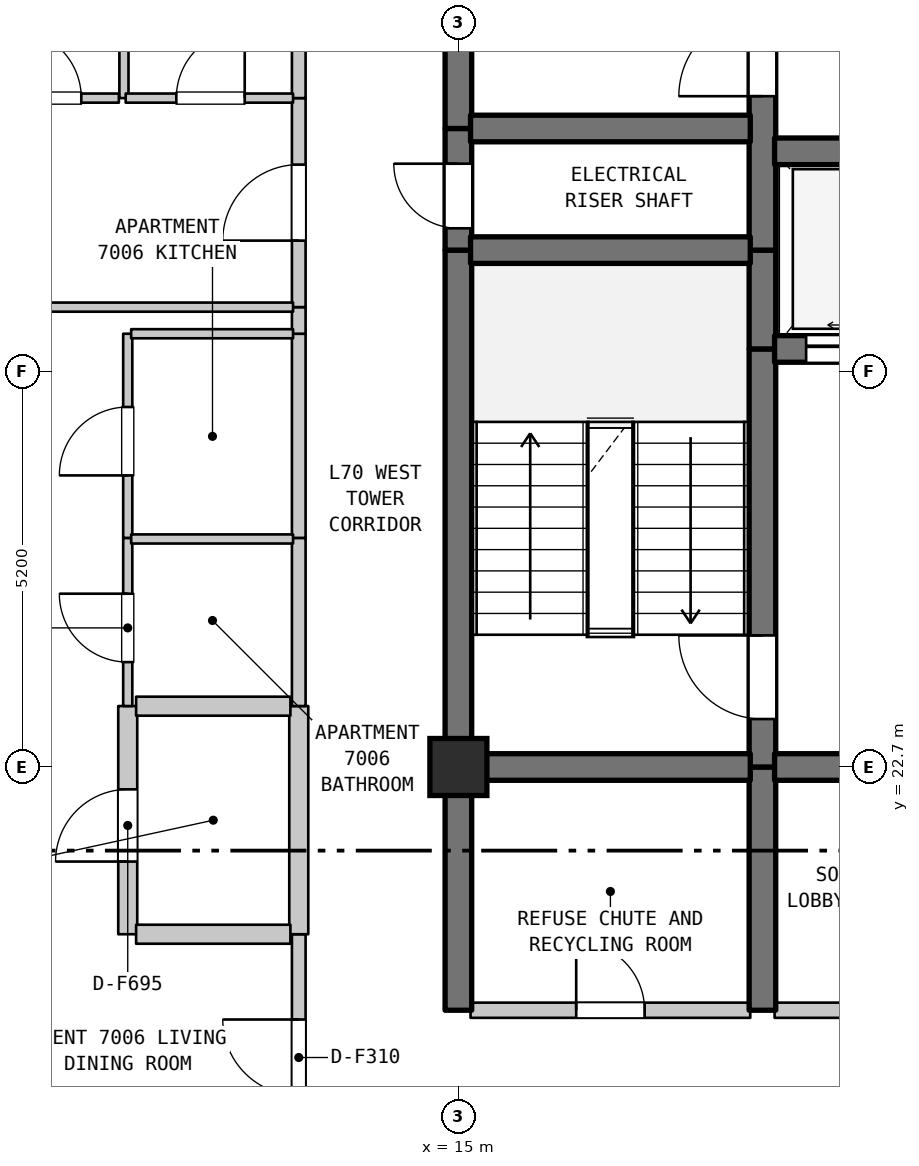
"""IFC4 building model, lengths in metres.
Left out: names, types, materials, properties, quantities, classifications, styles, units other than length and angle.
Written with IfcOpenShell. Run it as: python <this file> out.ifc"""

import sys

from ifc_helpers import new_model, si_unit, direction, frame, frame_2d, origin, origin_2d, place, context, subcontext, project, spatial, rectangle, extrude, element, fill, save


model = new_model("IFC4")
c1 = context("Model", 3, precision=1e-05, world=origin(), true_north=direction((0.0, 1.0)))
c2 = subcontext(c1, "Body", "Model", "MODEL_VIEW")
j1 = project(units=[si_unit("LENGTHUNIT", "METRE"), si_unit("PLANEANGLEUNIT", "RADIAN")], contexts=[c1])
p1 = place(None, origin())
s1 = spatial("IfcSite", under=j1, at=p1, CompositionType="ELEMENT")
p2 = place(p1, origin())
s2 = spatial("IfcBuilding", under=s1, at=p2, CompositionType="ELEMENT")
p3 = place(p2, frame((0.0, 0.0, 280.6)))
s3 = spatial("IfcBuildingStorey", under=s2, at=p3, CompositionType="ELEMENT", Elevation=280.6)
p4 = place(p3, frame((15.0, 22.7, 0.0), z_axis=(0.0, 0.0, 1.0), x_axis=(1.0, 0.0, 0.0)))
e1 = element("IfcColumn", 1, at=p4, inside=s3, PredefinedType="COLUMN", context=c2, shape_type="SweptSolid", body=[
    extrude(rectangle(XDim=0.75, YDim=0.75, at=origin_2d()), origin(), (0.0, 0.0, 1.0), 3.7),
])
p5 = place(p3, frame((10.6, 31.5, 0.0), z_axis=(0.0, 0.0, 1.0), x_axis=(0.0, 1.0, 0.0)))
e2 = element("IfcWall", 2, at=p5, inside=s3, PredefinedType="PARTITIONING", context=c2, shape_type="SweptSolid", body=[
    extrude(rectangle(XDim=8.6, YDim=0.12, at=frame_2d((4.3, 0.0))), origin(), (0.0, 0.0, 1.0), 3.39),
])
p6 = place(p3, frame((10.65, 20.5, 0.0), z_axis=(0.0, 0.0, 1.0), x_axis=(0.0, 1.0, 0.0)))
e3 = element("IfcWall", 3, at=p6, inside=s3, PredefinedType="STANDARD", context=c2, shape_type="SweptSolid", body=[
    extrude(rectangle(XDim=3.002, YDim=0.25, at=frame_2d((1.501, 0.0))), origin(), (0.0, 0.0, 1.0), 3.39),
])
p7 = place(p6, frame((0.956, 0.0, 0.0)))
e4 = element("IfcOpeningElement", 4, at=p7, cuts=e3, PredefinedType="OPENING", context=c2, shape_type="SweptSolid", body=[
    extrude(rectangle(XDim=0.95, YDim=2.15, at=frame_2d((0.475, 1.075))), frame((0.0, 0.135, 0.0), z_axis=(0.0, -1.0, 0.0), x_axis=(1.0, 0.0, 0.0)), (0.0, 0.0, 1.0), 0.27),
])
p8 = place(p3, frame((10.65, 23.502, 0.0), z_axis=(0.0, 0.0, 1.0), x_axis=(0.0, 1.0, 0.0)))
e5 = element("IfcWall", 5, at=p8, inside=s3, PredefinedType="PARTITIONING", context=c2, shape_type="SweptSolid", body=[
    extrude(rectangle(XDim=2.212, YDim=0.12, at=frame_2d((1.106, 0.0))), origin(), (0.0, 0.0, 1.0), 3.39),
])
p9 = place(p8, frame((0.578, 0.0, 0.0)))
e6 = element("IfcOpeningElement", 6, at=p9, cuts=e5, PredefinedType="OPENING", context=c2, shape_type="SweptSolid", body=[
    extrude(rectangle(XDim=0.9, YDim=2.1, at=frame_2d((0.45, 1.05))), frame((0.0, 0.07, 0.0), z_axis=(0.0, -1.0, 0.0), x_axis=(1.0, 0.0, 0.0)), (0.0, 0.0, 1.0), 0.14),
])
p10 = place(p3, frame((10.65, 25.714, 0.0), z_axis=(0.0, 0.0, 1.0), x_axis=(0.0, 1.0, 0.0)))
e7 = element("IfcWall", 7, at=p10, inside=s3, PredefinedType="PARTITIONING", context=c2, shape_type="SweptSolid", body=[
    extrude(rectangle(XDim=2.686, YDim=0.12, at=frame_2d((1.343, 0.0))), origin(), (0.0, 0.0, 1.0), 3.39),
])
p11 = place(p10, frame((0.822, 0.0, 0.0)))
e8 = element("IfcOpeningElement", 8, at=p11, cuts=e7, PredefinedType="OPENING", context=c2, shape_type="SweptSolid", body=[
    extrude(rectangle(XDim=0.9, YDim=2.15, at=frame_2d((0.45, 1.075))), frame((0.0, 0.07, 0.0), z_axis=(0.0, -1.0, 0.0), x_axis=(1.0, 0.0, 0.0)), (0.0, 0.0, 1.0), 0.14),
])
p12 = place(p3, frame((12.9, 17.4, 0.0), z_axis=(0.0, 0.0, 1.0), x_axis=(0.0, 1.0, 0.0)))
e9 = element("IfcWall", 9, at=p12, inside=s3, PredefinedType="STANDARD", context=c2, shape_type="SweptSolid", body=[
    extrude(rectangle(XDim=3.1, YDim=0.18, at=frame_2d((1.55, 0.0))), origin(), (0.0, 0.0, 1.0), 3.39),
])
p13 = place(p12, frame((0.978, 0.0, 0.0)))
e10 = element("IfcOpeningElement", 10, at=p13, cuts=e9, PredefinedType="OPENING", context=c2, shape_type="SweptSolid", body=[
    extrude(rectangle(XDim=1.0, YDim=2.15, at=frame_2d((0.5, 1.075))), frame((0.0, 0.1, 0.0), z_axis=(0.0, -1.0, 0.0), x_axis=(1.0, 0.0, 0.0)), (0.0, 0.0, 1.0), 0.2),
])
p14 = place(p3, frame((12.9, 20.5, 0.0), z_axis=(0.0, 0.0, 1.0), x_axis=(0.0, 1.0, 0.0)))
e11 = element("IfcWall", 11, at=p14, inside=s3, PredefinedType="STANDARD", context=c2, shape_type="SweptSolid", body=[
    extrude(rectangle(XDim=3.002, YDim=0.25, at=frame_2d((1.501, 0.0))), origin(), (0.0, 0.0, 1.0), 3.39),
])
p15 = place(p3, frame((12.9, 23.502, 0.0), z_axis=(0.0, 0.0, 1.0), x_axis=(0.0, 1.0, 0.0)))
e12 = element("IfcWall", 12, at=p15, inside=s3, PredefinedType="STANDARD", context=c2, shape_type="SweptSolid", body=[
    extrude(rectangle(XDim=2.212, YDim=0.18, at=frame_2d((1.106, 0.0))), origin(), (0.0, 0.0, 1.0), 3.39),
])
p16 = place(p3, frame((12.9, 25.714, 0.0), z_axis=(0.0, 0.0, 1.0), x_axis=(0.0, 1.0, 0.0)))
e13 = element("IfcWall", 13, at=p16, inside=s3, PredefinedType="STANDARD", context=c2, shape_type="SweptSolid", body=[
    extrude(rectangle(XDim=2.686, YDim=0.18, at=frame_2d((1.343, 0.0))), origin(), (0.0, 0.0, 1.0), 3.39),
])
p17 = place(p3, frame((12.9, 28.4, 0.0), z_axis=(0.0, 0.0, 1.0), x_axis=(0.0, 1.0, 0.0)))
e14 = element("IfcWall", 14, at=p17, inside=s3, PredefinedType="STANDARD", context=c2, shape_type="SweptSolid", body=[
    extrude(rectangle(XDim=0.35, YDim=0.18, at=frame_2d((0.175, 0.0))), origin(), (0.0, 0.0, 1.0), 3.39),
])
p18 = place(p3, frame((12.9, 28.75, 0.0), z_axis=(0.0, 0.0, 1.0), x_axis=(0.0, 1.0, 0.0)))
e15 = element("IfcWall", 15, at=p18, inside=s3, PredefinedType="STANDARD", context=c2, shape_type="SweptSolid", body=[
    extrude(rectangle(XDim=2.75, YDim=0.18, at=frame_2d((1.375, 0.0))), origin(), (0.0, 0.0, 1.0), 3.39),
])
p19 = place(p18, frame((0.875, 0.0, 0.0)))
e16 = element("IfcOpeningElement", 16, at=p19, cuts=e15, PredefinedType="OPENING", context=c2, shape_type="SweptSolid", body=[
    extrude(rectangle(XDim=1.0, YDim=2.15, at=frame_2d((0.5, 1.075))), frame((0.0, 0.1, 0.0), z_axis=(0.0, -1.0, 0.0), x_axis=(1.0, 0.0, 0.0)), (0.0, 0.0, 1.0), 0.2),
])
p20 = place(p3, frame((12.9, 31.5, 0.0), z_axis=(0.0, 0.0, 1.0), x_axis=(0.0, 1.0, 0.0)))
e17 = element("IfcWall", 17, at=p20, inside=s3, PredefinedType="STANDARD", context=c2, shape_type="SweptSolid", body=[
    extrude(rectangle(XDim=8.6, YDim=0.18, at=frame_2d((4.3, 0.0))), origin(), (0.0, 0.0, 1.0), 3.39),
])
p21 = place(p3, frame((15.0, 19.5, 0.0), z_axis=(0.0, 0.0, 1.0), x_axis=(0.0, 1.0, 0.0)))
e18 = element("IfcWall", 18, at=p21, inside=s3, PredefinedType="SHEAR", context=c2, shape_type="SweptSolid", body=[
    extrude(rectangle(XDim=3.2, YDim=0.35, at=frame_2d((1.6, 0.0))), origin(), (0.0, 0.0, 1.0), 3.39),
])
p22 = place(p3, frame((15.0, 22.7, 0.0), z_axis=(0.0, 0.0, 1.0), x_axis=(0.0, 1.0, 0.0)))
e19 = element("IfcWall", 19, at=p22, inside=s3, PredefinedType="SHEAR", context=c2, shape_type="SweptSolid", body=[
    extrude(rectangle(XDim=6.8, YDim=0.35, at=frame_2d((3.4, 0.0))), origin(), (0.0, 0.0, 1.0), 3.39),
])
p23 = place(p3, frame((15.0, 29.5, 0.0), z_axis=(0.0, 0.0, 1.0), x_axis=(0.0, 1.0, 0.0)))
e20 = element("IfcWall", 20, at=p23, inside=s3, PredefinedType="SHEAR", context=c2, shape_type="SweptSolid", body=[
    extrude(rectangle(XDim=1.6, YDim=0.35, at=frame_2d((0.8, 0.0))), origin(), (0.0, 0.0, 1.0), 3.39),
])
p24 = place(p23, frame((0.287, 0.0, 0.0)))
e21 = element("IfcOpeningElement", 21, at=p24, cuts=e20, PredefinedType="OPENING", context=c2, shape_type="SweptSolid", body=[
    extrude(rectangle(XDim=0.85, YDim=2.1, at=frame_2d((0.425, 1.05))), frame((0.0, 0.185, 0.0), z_axis=(0.0, -1.0, 0.0), x_axis=(1.0, 0.0, 0.0)), (0.0, 0.0, 1.0), 0.37),
])
p25 = place(p3, frame((15.0, 31.1, 0.0), z_axis=(0.0, 0.0, 1.0), x_axis=(0.0, 1.0, 0.0)))
e22 = element("IfcWall", 22, at=p25, inside=s3, PredefinedType="SHEAR", context=c2, shape_type="SweptSolid", body=[
    extrude(rectangle(XDim=6.8, YDim=0.35, at=frame_2d((3.4, 0.0))), origin(), (0.0, 0.0, 1.0), 3.39),
])
p26 = place(p3, frame((19.0, 19.5, 0.0), z_axis=(0.0, 0.0, 1.0), x_axis=(0.0, 1.0, 0.0)))
e23 = element("IfcWall", 23, at=p26, inside=s3, PredefinedType="SHEAR", context=c2, shape_type="SweptSolid", body=[
    extrude(rectangle(XDim=3.2, YDim=0.35, at=frame_2d((1.6, 0.0))), origin(), (0.0, 0.0, 1.0), 3.39),
])
p27 = place(p3, frame((19.0, 22.7, 0.0), z_axis=(0.0, 0.0, 1.0), x_axis=(0.0, 1.0, 0.0)))
e24 = element("IfcWall", 24, at=p27, inside=s3, PredefinedType="SHEAR", context=c2, shape_type="SweptSolid", body=[
    extrude(rectangle(XDim=5.5, YDim=0.35, at=frame_2d((2.75, 0.0))), origin(), (0.0, 0.0, 1.0), 3.39),
])
p28 = place(p27, frame((0.631, 0.0, 0.0)))
e25 = element("IfcOpeningElement", 25, at=p28, cuts=e24, PredefinedType="OPENING", context=c2, shape_type="SweptSolid", body=[
    extrude(rectangle(XDim=1.1, YDim=2.15, at=frame_2d((0.55, 1.075))), frame((0.0, 0.185, 0.0), z_axis=(0.0, -1.0, 0.0), x_axis=(1.0, 0.0, 0.0)), (0.0, 0.0, 1.0), 0.37),
])
p29 = place(p3, frame((19.0, 28.2, 0.0), z_axis=(0.0, 0.0, 1.0), x_axis=(0.0, 1.0, 0.0)))
e26 = element("IfcWall", 26, at=p29, inside=s3, PredefinedType="SHEAR", context=c2, shape_type="SweptSolid", body=[
    extrude(rectangle(XDim=1.3, YDim=0.35, at=frame_2d((0.65, 0.0))), origin(), (0.0, 0.0, 1.0), 3.39),
])
p30 = place(p3, frame((19.0, 29.5, 0.0), z_axis=(0.0, 0.0, 1.0), x_axis=(0.0, 1.0, 0.0)))
e27 = element("IfcWall", 27, at=p30, inside=s3, PredefinedType="SHEAR", context=c2, shape_type="SweptSolid", body=[
    extrude(rectangle(XDim=5.5, YDim=0.35, at=frame_2d((2.75, 0.0))), origin(), (0.0, 0.0, 1.0), 3.39),
])
p31 = place(p30, frame((2.025, 0.0, 0.0)))
e28 = element("IfcOpeningElement", 28, at=p31, cuts=e27, PredefinedType="OPENING", context=c2, shape_type="SweptSolid", body=[
    extrude(rectangle(XDim=1.1, YDim=2.15, at=frame_2d((0.55, 1.075))), frame((0.0, 0.185, 0.0), z_axis=(0.0, -1.0, 0.0), x_axis=(1.0, 0.0, 0.0)), (0.0, 0.0, 1.0), 0.37),
])
p32 = place(p3, frame((15.16, 19.5, 0.0), z_axis=(0.0, 0.0, 1.0), x_axis=(1.0, 0.0, 0.0)))
e29 = element("IfcWall", 29, at=p32, inside=s3, PredefinedType="STANDARD", context=c2, shape_type="SweptSolid", body=[
    extrude(rectangle(XDim=3.68, YDim=0.2, at=frame_2d((1.84, 0.0))), origin(), (0.0, 0.0, 1.0), 3.39),
])
p33 = place(p32, frame((1.39, 0.0, 0.0)))
e30 = element("IfcOpeningElement", 30, at=p33, cuts=e29, PredefinedType="OPENING", context=c2, shape_type="SweptSolid", body=[
    extrude(rectangle(XDim=0.9, YDim=2.15, at=frame_2d((0.45, 1.075))), frame((0.0, 0.11, 0.0), z_axis=(0.0, -1.0, 0.0), x_axis=(1.0, 0.0, 0.0)), (0.0, 0.0, 1.0), 0.22),
])
p34 = place(p3, frame((19.16, 19.5, 0.0), z_axis=(0.0, 0.0, 1.0), x_axis=(1.0, 0.0, 0.0)))
e31 = element("IfcWall", 31, at=p34, inside=s3, PredefinedType="STANDARD", context=c2, shape_type="SweptSolid", body=[
    extrude(rectangle(XDim=4.48, YDim=0.2, at=frame_2d((2.24, 0.0))), origin(), (0.0, 0.0, 1.0), 3.39),
])
p35 = place(p34, frame((1.64, 0.0, 0.0)))
e32 = element("IfcOpeningElement", 32, at=p35, cuts=e31, PredefinedType="OPENING", context=c2, shape_type="SweptSolid", body=[
    extrude(rectangle(XDim=1.2, YDim=2.2, at=frame_2d((0.6, 1.1))), frame((0.0, 0.11, 0.0), z_axis=(0.0, -1.0, 0.0), x_axis=(1.0, 0.0, 0.0)), (0.0, 0.0, 1.0), 0.22),
])
p36 = place(p3, frame((10.76, 20.5, 0.0), z_axis=(0.0, 0.0, 1.0), x_axis=(1.0, 0.0, 0.0)))
e33 = element("IfcWall", 33, at=p36, inside=s3, PredefinedType="STANDARD", context=c2, shape_type="SweptSolid", body=[
    extrude(rectangle(XDim=2.03, YDim=0.25, at=frame_2d((1.015, 0.0))), origin(), (0.0, 0.0, 1.0), 3.39),
])
p37 = place(p3, frame((15.16, 22.7, 0.0), z_axis=(0.0, 0.0, 1.0), x_axis=(1.0, 0.0, 0.0)))
e34 = element("IfcWall", 34, at=p37, inside=s3, PredefinedType="SHEAR", context=c2, shape_type="SweptSolid", body=[
    extrude(rectangle(XDim=3.68, YDim=0.35, at=frame_2d((1.84, 0.0))), origin(), (0.0, 0.0, 1.0), 3.39),
])
p38 = place(p3, frame((19.16, 22.7, 0.0), z_axis=(0.0, 0.0, 1.0), x_axis=(1.0, 0.0, 0.0)))
e35 = element("IfcWall", 35, at=p38, inside=s3, PredefinedType="SHEAR", context=c2, shape_type="SweptSolid", body=[
    extrude(rectangle(XDim=4.48, YDim=0.35, at=frame_2d((2.24, 0.0))), origin(), (0.0, 0.0, 1.0), 3.39),
])
p39 = place(p38, frame((1.64, 0.0, 0.0)))
e36 = element("IfcOpeningElement", 36, at=p39, cuts=e35, PredefinedType="OPENING", context=c2, shape_type="SweptSolid", body=[
    extrude(rectangle(XDim=1.2, YDim=2.2, at=frame_2d((0.6, 1.1))), frame((0.0, 0.185, 0.0), z_axis=(0.0, -1.0, 0.0), x_axis=(1.0, 0.0, 0.0)), (0.0, 0.0, 1.0), 0.37),
])
p40 = place(p3, frame((10.76, 23.5, 0.0), z_axis=(0.0, 0.0, 1.0), x_axis=(1.0, 0.0, 0.0)))
e37 = element("IfcWall", 37, at=p40, inside=s3, PredefinedType="STANDARD", context=c2, shape_type="SweptSolid", body=[
    extrude(rectangle(XDim=2.03, YDim=0.25, at=frame_2d((1.015, 0.0))), origin(), (0.0, 0.0, 1.0), 3.39),
])
p41 = place(p3, frame((10.695, 25.7, 0.0), z_axis=(0.0, 0.0, 1.0), x_axis=(1.0, 0.0, 0.0)))
e38 = element("IfcWall", 38, at=p41, inside=s3, PredefinedType="PARTITIONING", context=c2, shape_type="SweptSolid", body=[
    extrude(rectangle(XDim=2.13, YDim=0.12, at=frame_2d((1.065, 0.0))), origin(), (0.0, 0.0, 1.0), 3.39),
])
p42 = place(p3, frame((19.16, 28.2, 0.0), z_axis=(0.0, 0.0, 1.0), x_axis=(1.0, 0.0, 0.0)))
e39 = element("IfcWall", 39, at=p42, inside=s3, PredefinedType="SHEAR", context=c2, shape_type="SweptSolid", body=[
    extrude(rectangle(XDim=4.48, YDim=0.35, at=frame_2d((2.24, 0.0))), origin(), (0.0, 0.0, 1.0), 3.39),
])
p43 = place(p42, frame((0.415, 0.0, 0.0)))
e40 = element("IfcOpeningElement", 40, at=p43, cuts=e39, PredefinedType="OPENING", context=c2, shape_type="SweptSolid", body=[
    extrude(rectangle(XDim=1.25, YDim=2.2, at=frame_2d((0.625, 1.1))), frame((0.0, 0.185, 0.0), z_axis=(0.0, -1.0, 0.0), x_axis=(1.0, 0.0, 0.0)), (0.0, 0.0, 1.0), 0.37),
])
p44 = place(p42, frame((2.815, 0.0, 0.0)))
e41 = element("IfcOpeningElement", 41, at=p44, cuts=e39, PredefinedType="OPENING", context=c2, shape_type="SweptSolid", body=[
    extrude(rectangle(XDim=1.25, YDim=2.2, at=frame_2d((0.625, 1.1))), frame((0.0, 0.185, 0.0), z_axis=(0.0, -1.0, 0.0), x_axis=(1.0, 0.0, 0.0)), (0.0, 0.0, 1.0), 0.37),
])
p45 = place(p3, frame((10.695, 28.4, 0.0), z_axis=(0.0, 0.0, 1.0), x_axis=(1.0, 0.0, 0.0)))
e42 = element("IfcWall", 42, at=p45, inside=s3, PredefinedType="PARTITIONING", context=c2, shape_type="SweptSolid", body=[
    extrude(rectangle(XDim=2.13, YDim=0.12, at=frame_2d((1.065, 0.0))), origin(), (0.0, 0.0, 1.0), 3.39),
])
p46 = place(p3, frame((9.175, 28.75, 0.0), z_axis=(0.0, 0.0, 1.0), x_axis=(1.0, 0.0, 0.0)))
e43 = element("IfcWall", 43, at=p46, inside=s3, PredefinedType="PARTITIONING", context=c2, shape_type="SweptSolid", body=[
    extrude(rectangle(XDim=3.65, YDim=0.12, at=frame_2d((1.825, 0.0))), origin(), (0.0, 0.0, 1.0), 3.39),
])
p47 = place(p3, frame((15.16, 29.5, 0.0), z_axis=(0.0, 0.0, 1.0), x_axis=(1.0, 0.0, 0.0)))
e44 = element("IfcWall", 44, at=p47, inside=s3, PredefinedType="SHEAR", context=c2, shape_type="SweptSolid", body=[
    extrude(rectangle(XDim=3.68, YDim=0.35, at=frame_2d((1.84, 0.0))), origin(), (0.0, 0.0, 1.0), 3.39),
])
p48 = place(p3, frame((19.16, 30.8, 0.0), z_axis=(0.0, 0.0, 1.0), x_axis=(1.0, 0.0, 0.0)))
e45 = element("IfcWall", 45, at=p48, inside=s3, PredefinedType="SHEAR", context=c2, shape_type="SweptSolid", body=[
    extrude(rectangle(XDim=4.48, YDim=0.35, at=frame_2d((2.24, 0.0))), origin(), (0.0, 0.0, 1.0), 3.39),
])
p49 = place(p3, frame((15.16, 31.1, 0.0), z_axis=(0.0, 0.0, 1.0), x_axis=(1.0, 0.0, 0.0)))
e46 = element("IfcWall", 46, at=p49, inside=s3, PredefinedType="SHEAR", context=c2, shape_type="SweptSolid", body=[
    extrude(rectangle(XDim=3.68, YDim=0.35, at=frame_2d((1.84, 0.0))), origin(), (0.0, 0.0, 1.0), 3.39),
])
p50 = place(p3, frame((8.645, 31.5, 0.0), z_axis=(0.0, 0.0, 1.0), x_axis=(1.0, 0.0, 0.0)))
e47 = element("IfcWall", 47, at=p50, inside=s3, PredefinedType="PARTITIONING", context=c2, shape_type="SweptSolid", body=[
    extrude(rectangle(XDim=1.888, YDim=0.12, at=frame_2d((0.944, 0.0))), origin(), (0.0, 0.0, 1.0), 3.39),
])
p51 = place(p50, frame((0.494, 0.0, 0.0)))
e48 = element("IfcOpeningElement", 48, at=p51, cuts=e47, PredefinedType="OPENING", context=c2, shape_type="SweptSolid", body=[
    extrude(rectangle(XDim=0.9, YDim=2.15, at=frame_2d((0.45, 1.075))), frame((0.0, 0.07, 0.0), z_axis=(0.0, -1.0, 0.0), x_axis=(1.0, 0.0, 0.0)), (0.0, 0.0, 1.0), 0.14),
])
p52 = place(p3, frame((10.623, 31.5, 0.0), z_axis=(0.0, 0.0, 1.0), x_axis=(1.0, 0.0, 0.0)))
e49 = element("IfcWall", 49, at=p52, inside=s3, PredefinedType="PARTITIONING", context=c2, shape_type="SweptSolid", body=[
    extrude(rectangle(XDim=2.202, YDim=0.12, at=frame_2d((1.101, 0.0))), origin(), (0.0, 0.0, 1.0), 3.39),
])
p53 = place(p52, frame((0.666, 0.0, 0.0)))
e50 = element("IfcOpeningElement", 50, at=p53, cuts=e49, PredefinedType="OPENING", context=c2, shape_type="SweptSolid", body=[
    extrude(rectangle(XDim=0.9, YDim=2.1, at=frame_2d((0.45, 1.05))), frame((0.0, 0.07, 0.0), z_axis=(0.0, -1.0, 0.0), x_axis=(1.0, 0.0, 0.0)), (0.0, 0.0, 1.0), 0.14),
])
p54 = place(p7, origin())
e51 = element("IfcDoor", 51, at=p54, inside=s3, OperationType="SINGLE_SWING_LEFT", PredefinedType="DOOR", context=c2, shape_type="SweptSolid", body=[
    extrude(rectangle(XDim=0.95, YDim=2.15, at=frame_2d((0.475, 1.075))), frame((0.0, 0.025, 0.0), z_axis=(0.0, -1.0, 0.0), x_axis=(1.0, 0.0, 0.0)), (0.0, 0.0, 1.0), 0.05),
])
fill(e4, e51)
p55 = place(p9, origin())
e52 = element("IfcDoor", 52, at=p55, inside=s3, OperationType="SINGLE_SWING_RIGHT", PredefinedType="DOOR", context=c2, shape_type="SweptSolid", body=[
    extrude(rectangle(XDim=0.9, YDim=2.1, at=frame_2d((0.45, 1.05))), frame((0.0, 0.025, 0.0), z_axis=(0.0, -1.0, 0.0), x_axis=(1.0, 0.0, 0.0)), (0.0, 0.0, 1.0), 0.05),
])
fill(e6, e52)
p56 = place(p11, origin())
e53 = element("IfcDoor", 53, at=p56, inside=s3, OperationType="SINGLE_SWING_LEFT", PredefinedType="DOOR", context=c2, shape_type="SweptSolid", body=[
    extrude(rectangle(XDim=0.9, YDim=2.15, at=frame_2d((0.45, 1.075))), frame((0.0, 0.025, 0.0), z_axis=(0.0, -1.0, 0.0), x_axis=(1.0, 0.0, 0.0)), (0.0, 0.0, 1.0), 0.05),
])
fill(e8, e53)
p57 = place(p13, origin())
e54 = element("IfcDoor", 54, at=p57, inside=s3, OperationType="SINGLE_SWING_RIGHT", PredefinedType="DOOR", context=c2, shape_type="SweptSolid", body=[
    extrude(rectangle(XDim=1.0, YDim=2.15, at=frame_2d((0.5, 1.075))), frame((0.0, 0.025, 0.0), z_axis=(0.0, -1.0, 0.0), x_axis=(1.0, 0.0, 0.0)), (0.0, 0.0, 1.0), 0.05),
])
fill(e10, e54)
p58 = place(p19, origin())
e55 = element("IfcDoor", 55, at=p58, inside=s3, OperationType="SINGLE_SWING_LEFT", PredefinedType="DOOR", context=c2, shape_type="SweptSolid", body=[
    extrude(rectangle(XDim=1.0, YDim=2.15, at=frame_2d((0.5, 1.075))), frame((0.0, 0.025, 0.0), z_axis=(0.0, -1.0, 0.0), x_axis=(1.0, 0.0, 0.0)), (0.0, 0.0, 1.0), 0.05),
])
fill(e16, e55)
p59 = place(p24, origin())
e56 = element("IfcDoor", 56, at=p59, inside=s3, OperationType="SINGLE_SWING_RIGHT", PredefinedType="DOOR", context=c2, shape_type="SweptSolid", body=[
    extrude(rectangle(XDim=0.85, YDim=2.1, at=frame_2d((0.425, 1.05))), frame((0.0, 0.025, 0.0), z_axis=(0.0, -1.0, 0.0), x_axis=(1.0, 0.0, 0.0)), (0.0, 0.0, 1.0), 0.05),
])
fill(e21, e56)
p60 = place(p28, origin())
e57 = element("IfcDoor", 57, at=p60, inside=s3, OperationType="SINGLE_SWING_RIGHT", PredefinedType="DOOR", context=c2, shape_type="SweptSolid", body=[
    extrude(rectangle(XDim=1.1, YDim=2.15, at=frame_2d((0.55, 1.075))), frame((0.0, 0.025, 0.0), z_axis=(0.0, -1.0, 0.0), x_axis=(1.0, 0.0, 0.0)), (0.0, 0.0, 1.0), 0.05),
])
fill(e25, e57)
p61 = place(p31, origin())
e58 = element("IfcDoor", 58, at=p61, inside=s3, OperationType="SINGLE_SWING_LEFT", PredefinedType="DOOR", context=c2, shape_type="SweptSolid", body=[
    extrude(rectangle(XDim=1.1, YDim=2.15, at=frame_2d((0.55, 1.075))), frame((0.0, 0.025, 0.0), z_axis=(0.0, -1.0, 0.0), x_axis=(1.0, 0.0, 0.0)), (0.0, 0.0, 1.0), 0.05),
])
fill(e28, e58)
p62 = place(p33, origin())
e59 = element("IfcDoor", 59, at=p62, inside=s3, OperationType="SINGLE_SWING_LEFT", PredefinedType="DOOR", context=c2, shape_type="SweptSolid", body=[
    extrude(rectangle(XDim=0.9, YDim=2.15, at=frame_2d((0.45, 1.075))), frame((0.0, 0.025, 0.0), z_axis=(0.0, -1.0, 0.0), x_axis=(1.0, 0.0, 0.0)), (0.0, 0.0, 1.0), 0.05),
])
fill(e30, e59)
p63 = place(p43, origin())
e60 = element("IfcDoor", 60, at=p63, inside=s3, OperationType="DOUBLE_DOOR_SLIDING", PredefinedType="DOOR", context=c2, shape_type="SweptSolid", body=[
    extrude(rectangle(XDim=1.25, YDim=2.2, at=frame_2d((0.625, 1.1))), frame((0.0, 0.025, 0.0), z_axis=(0.0, -1.0, 0.0), x_axis=(1.0, 0.0, 0.0)), (0.0, 0.0, 1.0), 0.05),
])
fill(e40, e60)
p64 = place(p51, origin())
e61 = element("IfcDoor", 61, at=p64, inside=s3, OperationType="SINGLE_SWING_LEFT", PredefinedType="DOOR", context=c2, shape_type="SweptSolid", body=[
    extrude(rectangle(XDim=0.9, YDim=2.15, at=frame_2d((0.45, 1.075))), frame((0.0, 0.025, 0.0), z_axis=(0.0, -1.0, 0.0), x_axis=(1.0, 0.0, 0.0)), (0.0, 0.0, 1.0), 0.05),
])
fill(e48, e61)
p65 = place(p53, origin())
e62 = element("IfcDoor", 62, at=p65, inside=s3, OperationType="SINGLE_SWING_RIGHT", PredefinedType="DOOR", context=c2, shape_type="SweptSolid", body=[
    extrude(rectangle(XDim=0.9, YDim=2.1, at=frame_2d((0.45, 1.05))), frame((0.0, 0.025, 0.0), z_axis=(0.0, -1.0, 0.0), x_axis=(1.0, 0.0, 0.0)), (0.0, 0.0, 1.0), 0.05),
])
fill(e50, e62)
save(model, sys.argv[1])
